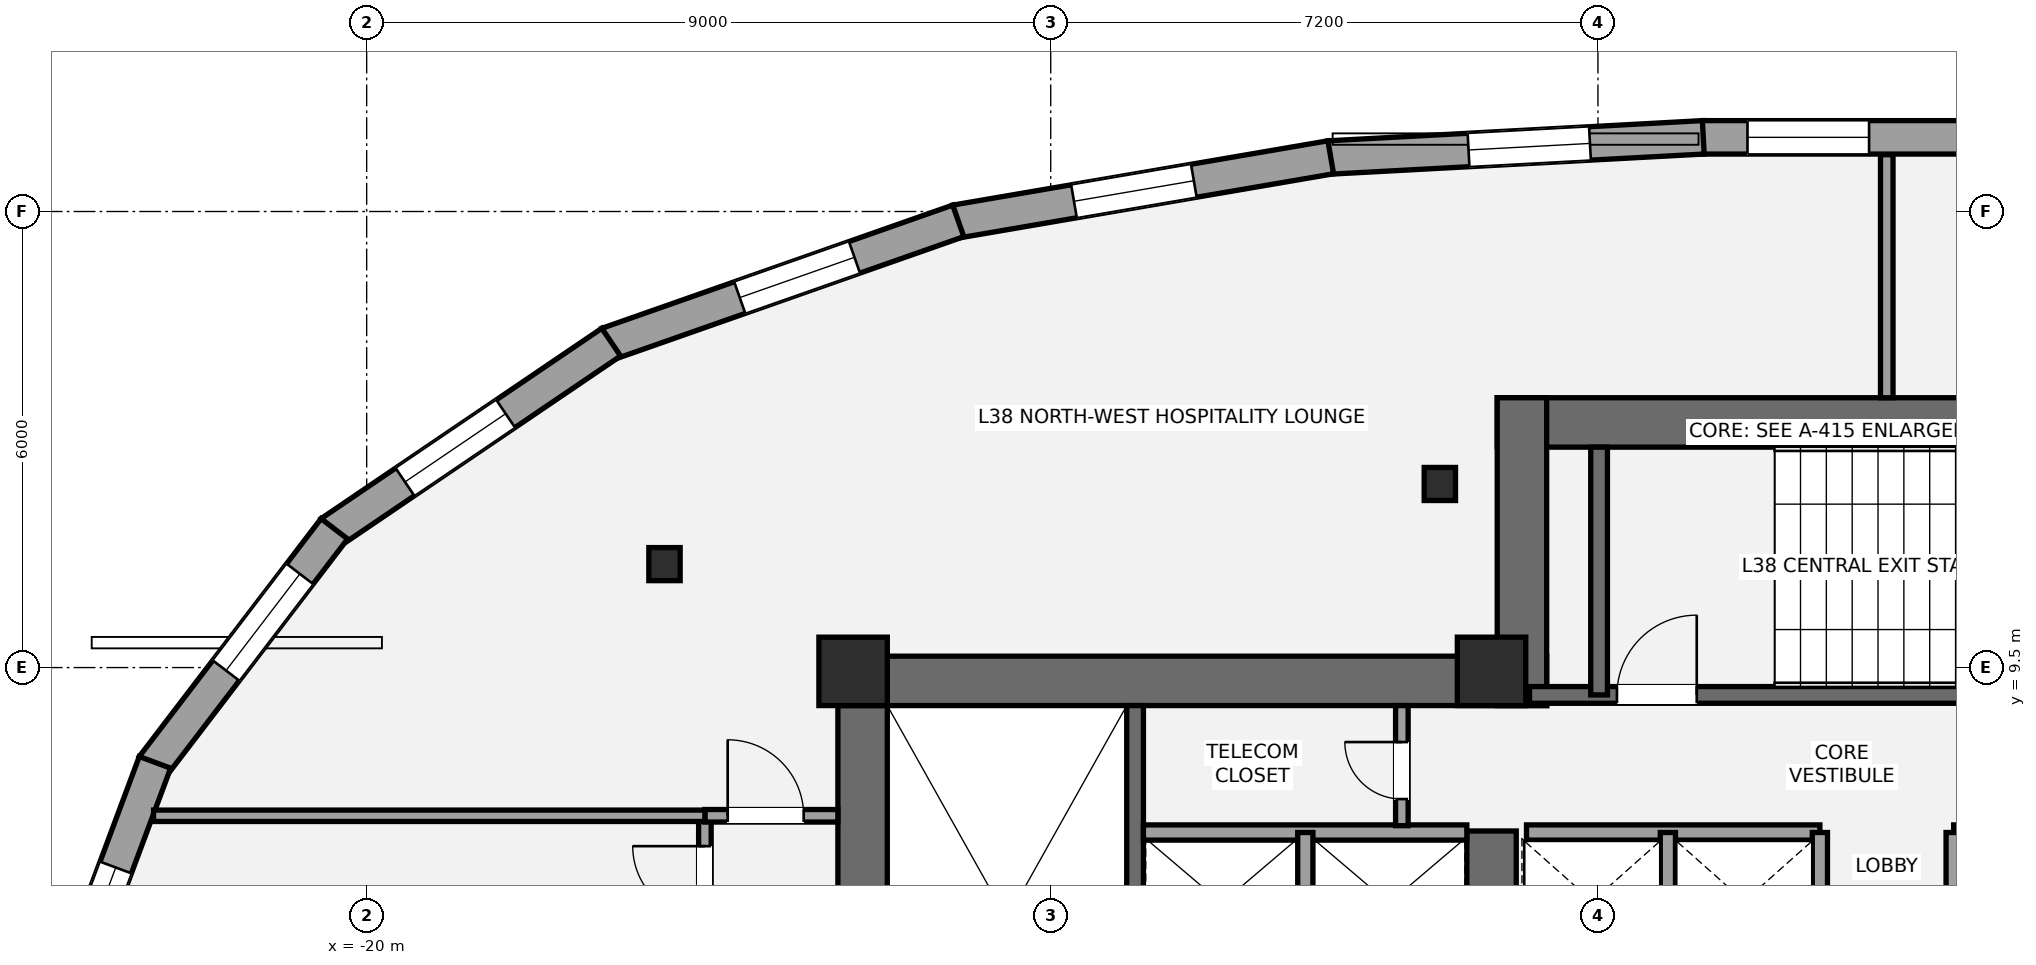
"""IFC4 building model, lengths in metres.
Left out: names, types, materials, properties, quantities, classifications, styles, units other than length and angle.
Written with IfcOpenShell. Run it as: python <this file> out.ifc"""

import sys

from ifc_helpers import new_model, si_unit, direction, frame, frame_2d, origin, origin_2d, place, context, subcontext, project, spatial, rectangle, i_section, extrude, element, fill, save


model = new_model("IFC4")
c1 = context("Model", 3, precision=1e-05, world=origin(), true_north=direction((0.0, 1.0)))
c2 = subcontext(c1, "Body", "Model", "MODEL_VIEW")
j1 = project(units=[si_unit("LENGTHUNIT", "METRE"), si_unit("PLANEANGLEUNIT", "RADIAN")], contexts=[c1])
p1 = place(None, origin())
s1 = spatial("IfcSite", under=j1, at=p1, CompositionType="ELEMENT")
p2 = place(p1, origin())
s2 = spatial("IfcBuilding", under=s1, at=p2, CompositionType="ELEMENT")
p3 = place(p2, frame((0.0, 0.0, 143.8)))
s3 = spatial("IfcBuildingStorey", under=s2, at=p3, CompositionType="ELEMENT", Elevation=143.8)
p4 = place(p3, frame((-13.475, 1.2, 0.0), z_axis=(0.0, 0.0, 1.0), x_axis=(0.0, 1.0, 0.0)))
e1 = element("IfcWall", 1, at=p4, inside=s3, PredefinedType="SHEAR", context=c2, shape_type="SweptSolid", body=[
    extrude(rectangle(XDim=8.45, YDim=0.65, at=frame_2d((4.225, 0.0))), origin(), (0.0, 0.0, 1.0), 3.2),
])
p5 = place(p3, frame((-13.8, 9.325, 0.0), z_axis=(0.0, 0.0, 1.0), x_axis=(1.0, 0.0, 0.0)))
e2 = element("IfcWall", 2, at=p5, inside=s3, PredefinedType="SHEAR", context=c2, shape_type="SweptSolid", body=[
    extrude(rectangle(XDim=9.325, YDim=0.65, at=frame_2d((4.663, 0.0))), origin(), (0.0, 0.0, 1.0), 3.2),
])
p6 = place(p3, frame((-5.2, 5.35, 0.0), z_axis=(0.0, 0.0, 1.0), x_axis=(0.0, 1.0, 0.0)))
e3 = element("IfcWall", 3, at=p6, inside=s3, PredefinedType="SHEAR", context=c2, shape_type="SweptSolid", body=[
    extrude(rectangle(XDim=2.0, YDim=0.65, at=frame_2d((1.0, 0.0))), origin(), (0.0, 0.0, 1.0), 3.2),
])
p7 = place(p3, frame((-9.89, 1.85, 0.0), z_axis=(0.0, 0.0, 1.0), x_axis=(0.0, 1.0, 0.0)))
e4 = element("IfcWall", 4, at=p7, inside=s3, PredefinedType="SHEAR", context=c2, shape_type="SweptSolid", body=[
    extrude(rectangle(XDim=7.15, YDim=0.22, at=frame_2d((3.575, 0.0))), origin(), (0.0, 0.0, 1.0), 3.2),
])
p8 = place(p3, frame((-5.125, 12.725, 0.0), z_axis=(0.0, 0.0, 1.0), x_axis=(1.0, 0.0, 0.0)))
e5 = element("IfcWall", 5, at=p8, inside=s3, PredefinedType="SHEAR", context=c2, shape_type="SweptSolid", body=[
    extrude(rectangle(XDim=10.25, YDim=0.65, at=frame_2d((5.125, 0.0))), origin(), (0.0, 0.0, 1.0), 3.2),
])
p9 = place(p3, frame((-4.8, 9.0, 0.0), z_axis=(0.0, 0.0, 1.0), x_axis=(0.0, 1.0, 0.0)))
e6 = element("IfcWall", 6, at=p9, inside=s3, PredefinedType="SHEAR", context=c2, shape_type="SweptSolid", body=[
    extrude(rectangle(XDim=4.05, YDim=0.65, at=frame_2d((2.025, 0.0))), origin(), (0.0, 0.0, 1.0), 3.2),
])
p10 = place(p3, frame((-4.7, 9.14, 0.0), z_axis=(0.0, 0.0, 1.0), x_axis=(1.0, 0.0, 0.0)))
e7 = element("IfcWall", 7, at=p10, inside=s3, PredefinedType="SHEAR", context=c2, shape_type="SweptSolid", body=[
    extrude(rectangle(XDim=9.3, YDim=0.22, at=frame_2d((4.65, 0.0))), origin(), (0.0, 0.0, 1.0), 3.2),
])
p11 = place(p10, frame((1.15, 0.0, 0.0)))
e8 = element("IfcOpeningElement", 8, at=p11, cuts=e7, PredefinedType="OPENING", context=c2, shape_type="SweptSolid", body=[
    extrude(rectangle(XDim=1.05, YDim=2.15, at=frame_2d((0.525, 1.075))), frame((0.0, 0.12, 0.0), z_axis=(0.0, -1.0, 0.0), x_axis=(1.0, 0.0, 0.0)), (0.0, 0.0, 1.0), 0.24),
])
p12 = place(p3, frame((-3.785, 9.14, 0.0), z_axis=(0.0, 0.0, 1.0), x_axis=(0.0, 1.0, 0.0)))
e9 = element("IfcWall", 9, at=p12, inside=s3, PredefinedType="SHEAR", context=c2, shape_type="SweptSolid", body=[
    extrude(rectangle(XDim=3.26, YDim=0.22, at=frame_2d((1.63, 0.0))), origin(), (0.0, 0.0, 1.0), 3.2),
])
for number, where, z_axis, x_axis in (
    (10, (-13.6, 9.45, 0.0), (0.0, 0.0, 1.0), (1.0, 0.0, 0.0)),
    (11, (-5.2, 9.45, 0.0), (0.0, 0.0, 1.0), (1.0, 0.0, 0.0)),
):
    element("IfcColumn", number, at=place(p3, frame(where, z_axis=z_axis, x_axis=x_axis)), inside=s3, PredefinedType="COLUMN", context=c2, shape_type="SweptSolid", body=[
        extrude(rectangle(XDim=0.9, YDim=0.9, at=origin_2d()), origin(), (0.0, 0.0, 1.0), 3.2),
    ])
for number, where, z_axis, x_axis in (
    (12, (-5.88, 11.915, 0.0), (0.0, 0.0, 1.0), (1.0, 0.0, 0.0)),
    (13, (-16.082, 10.861, 0.0), (0.0, 0.0, 1.0), (1.0, 0.0, 0.0)),
):
    element("IfcColumn", number, at=place(p3, frame(where, z_axis=z_axis, x_axis=x_axis)), inside=s3, PredefinedType="COLUMN", context=c2, shape_type="SweptSolid", body=[
        extrude(i_section(OverallWidth=0.412, OverallDepth=0.435, WebThickness=0.036, FlangeThickness=0.057, at=origin_2d()), origin(), (0.0, 0.0, 1.0), 3.2),
    ])
p13 = place(p3, frame((-2.426, 16.476, 0.0), z_axis=(0.0, 0.0, 1.0), x_axis=(1.0, 0.0, 0.0)))
e14 = element("IfcWall", 14, at=p13, inside=s3, PredefinedType="STANDARD", context=c2, shape_type="SweptSolid", body=[
    extrude(rectangle(XDim=4.852, YDim=0.44, at=frame_2d((2.426, 0.0))), origin(), (0.0, 0.0, 1.0), 2.315),
])
p14 = place(p13, frame((0.594, 0.0, 0.58)))
e15 = element("IfcOpeningElement", 15, at=p14, cuts=e14, PredefinedType="OPENING", context=c2, shape_type="SweptSolid", body=[
    extrude(rectangle(XDim=1.6, YDim=1.55, at=frame_2d((0.8, 0.775))), frame((0.0, 0.23, 0.0), z_axis=(0.0, -1.0, 0.0), x_axis=(1.0, 0.0, 0.0)), (0.0, 0.0, 1.0), 0.46),
])
p15 = place(p3, frame((-7.341, 16.21, 0.0), z_axis=(0.0, 0.0, 1.0), x_axis=(0.998547098553, 0.05388591627, 0.0)))
e16 = element("IfcWall", 16, at=p15, inside=s3, PredefinedType="STANDARD", context=c2, shape_type="SweptSolid", body=[
    extrude(rectangle(XDim=4.934, YDim=0.44, at=frame_2d((2.467, 0.0))), origin(), (0.0, 0.0, 1.0), 2.315),
])
p16 = place(p15, frame((1.841, 0.0, 0.58)))
e17 = element("IfcOpeningElement", 17, at=p16, cuts=e16, PredefinedType="OPENING", context=c2, shape_type="SweptSolid", body=[
    extrude(rectangle(XDim=1.6, YDim=1.55, at=frame_2d((0.8, 0.775))), frame((0.0, 0.23, 0.0), z_axis=(0.0, -1.0, 0.0), x_axis=(1.0, 0.0, 0.0)), (0.0, 0.0, 1.0), 0.46),
])
p17 = place(p3, frame((-12.252, 15.367, 0.0), z_axis=(0.0, 0.0, 1.0), x_axis=(0.985640803986, 0.168855575915, 0.0)))
e18 = element("IfcWall", 18, at=p17, inside=s3, PredefinedType="STANDARD", context=c2, shape_type="SweptSolid", body=[
    extrude(rectangle(XDim=5.009, YDim=0.44, at=frame_2d((2.504, 0.0))), origin(), (0.0, 0.0, 1.0), 2.315),
])
p18 = place(p17, frame((1.581, 0.0, 0.58)))
e19 = element("IfcOpeningElement", 19, at=p18, cuts=e18, PredefinedType="OPENING", context=c2, shape_type="SweptSolid", body=[
    extrude(rectangle(XDim=1.6, YDim=1.55, at=frame_2d((0.8, 0.775))), frame((0.0, 0.23, 0.0), z_axis=(0.0, -1.0, 0.0), x_axis=(1.0, 0.0, 0.0)), (0.0, 0.0, 1.0), 0.46),
])
p19 = place(p3, frame((-16.833, 13.756, 0.0), z_axis=(0.0, 0.0, 1.0), x_axis=(0.943528860281, 0.331290340662, 0.0)))
e20 = element("IfcWall", 20, at=p19, inside=s3, PredefinedType="STANDARD", context=c2, shape_type="SweptSolid", body=[
    extrude(rectangle(XDim=4.893, YDim=0.44, at=frame_2d((2.447, 0.0))), origin(), (0.0, 0.0, 1.0), 2.315),
])
p20 = place(p19, frame((1.846, 0.0, 0.58)))
e21 = element("IfcOpeningElement", 21, at=p20, cuts=e20, PredefinedType="OPENING", context=c2, shape_type="SweptSolid", body=[
    extrude(rectangle(XDim=1.6, YDim=1.55, at=frame_2d((0.8, 0.775))), frame((0.0, 0.23, 0.0), z_axis=(0.0, -1.0, 0.0), x_axis=(1.0, 0.0, 0.0)), (0.0, 0.0, 1.0), 0.46),
])
p21 = place(p3, frame((-20.477, 11.277, 0.0), z_axis=(0.0, 0.0, 1.0), x_axis=(0.827741657842, 0.561109390291, 0.0)))
e22 = element("IfcWall", 22, at=p21, inside=s3, PredefinedType="STANDARD", context=c2, shape_type="SweptSolid", body=[
    extrude(rectangle(XDim=4.463, YDim=0.44, at=frame_2d((2.231, 0.0))), origin(), (0.0, 0.0, 1.0), 2.315),
])
p22 = place(p21, frame((1.185, 0.0, 0.58)))
e23 = element("IfcOpeningElement", 23, at=p22, cuts=e22, PredefinedType="OPENING", context=c2, shape_type="SweptSolid", body=[
    extrude(rectangle(XDim=1.6, YDim=1.55, at=frame_2d((0.8, 0.775))), frame((0.0, 0.23, 0.0), z_axis=(0.0, -1.0, 0.0), x_axis=(1.0, 0.0, 0.0)), (0.0, 0.0, 1.0), 0.46),
])
p23 = place(p3, frame((-22.817, 8.196, 0.0), z_axis=(0.0, 0.0, 1.0), x_axis=(0.607215400231, 0.794537260122, 0.0)))
e24 = element("IfcWall", 24, at=p23, inside=s3, PredefinedType="STANDARD", context=c2, shape_type="SweptSolid", body=[
    extrude(rectangle(XDim=3.939, YDim=0.44, at=frame_2d((1.969, 0.0))), origin(), (0.0, 0.0, 1.0), 2.315),
])
p24 = place(p23, frame((1.592, 0.0, 0.58)))
e25 = element("IfcOpeningElement", 25, at=p24, cuts=e24, PredefinedType="OPENING", context=c2, shape_type="SweptSolid", body=[
    extrude(rectangle(XDim=1.6, YDim=1.55, at=frame_2d((0.8, 0.775))), frame((0.0, 0.23, 0.0), z_axis=(0.0, -1.0, 0.0), x_axis=(1.0, 0.0, 0.0)), (0.0, 0.0, 1.0), 0.46),
])
p25 = place(p3, frame((-24.033, 4.907, 0.0), z_axis=(0.0, 0.0, 1.0), x_axis=(0.349422124021, 0.936965409844, 0.0)))
e26 = element("IfcWall", 26, at=p25, inside=s3, PredefinedType="STANDARD", context=c2, shape_type="SweptSolid", body=[
    extrude(rectangle(XDim=3.571, YDim=0.44, at=frame_2d((1.786, 0.0))), origin(), (0.0, 0.0, 1.0), 2.315),
])
p26 = place(p25, frame((0.495, 0.0, 0.58)))
e27 = element("IfcOpeningElement", 27, at=p26, cuts=e26, PredefinedType="OPENING", context=c2, shape_type="SweptSolid", body=[
    extrude(rectangle(XDim=1.6, YDim=1.55, at=frame_2d((0.8, 0.775))), frame((0.0, 0.23, 0.0), z_axis=(0.0, -1.0, 0.0), x_axis=(1.0, 0.0, 0.0)), (0.0, 0.0, 1.0), 0.46),
])
p27 = place(p3, frame((-9.78, 7.33, 0.0), z_axis=(0.0, 0.0, 1.0), x_axis=(1.0, 0.0, 0.0)))
e28 = element("IfcWall", 28, at=p27, inside=s3, PredefinedType="SOLIDWALL", context=c2, shape_type="SweptSolid", body=[
    extrude(rectangle(XDim=4.255, YDim=0.2, at=frame_2d((2.127, 0.0))), origin(), (0.0, 0.0, 1.0), 3.02),
])
p28 = place(p3, frame((-7.65, 5.47, 0.0), z_axis=(0.0, 0.0, 1.0), x_axis=(0.0, 1.0, 0.0)))
e29 = element("IfcWall", 29, at=p28, inside=s3, PredefinedType="SOLIDWALL", context=c2, shape_type="SweptSolid", body=[
    extrude(rectangle(XDim=1.86, YDim=0.2, at=frame_2d((0.93, 0.0))), origin(), (0.0, 0.0, 1.0), 3.02),
])
for number, where, z_axis, x_axis in (
    (30, (-4.74, 7.33, 0.0), (0.0, 0.0, 1.0), (1.0, 0.0, 0.0)),
    (31, (0.88, 7.33, 0.0), (0.0, 0.0, 1.0), (1.0, 0.0, 0.0)),
):
    element("IfcWall", number, at=place(p3, frame(where, z_axis=z_axis, x_axis=x_axis)), inside=s3, PredefinedType="SOLIDWALL", context=c2, shape_type="SweptSolid", body=[
        extrude(rectangle(XDim=3.86, YDim=0.2, at=frame_2d((1.93, 0.0))), origin(), (0.0, 0.0, 1.0), 3.02),
    ])
for number, where, z_axis, x_axis in (
    (32, (-2.88, 5.52, 0.0), (0.0, 0.0, 1.0), (0.0, 1.0, 0.0)),
    (33, (-0.88, 5.52, 0.0), (0.0, 0.0, 1.0), (0.0, 1.0, 0.0)),
    (34, (0.88, 5.52, 0.0), (0.0, 0.0, 1.0), (0.0, 1.0, 0.0)),
):
    element("IfcWall", number, at=place(p3, frame(where, z_axis=z_axis, x_axis=x_axis)), inside=s3, PredefinedType="SOLIDWALL", context=c2, shape_type="SweptSolid", body=[
        extrude(rectangle(XDim=1.81, YDim=0.2, at=frame_2d((0.905, 0.0))), origin(), (0.0, 0.0, 1.0), 3.02),
    ])
p29 = place(p3, frame((-6.38, 7.42, 0.0), z_axis=(0.0, 0.0, 1.0), x_axis=(0.0, 1.0, 0.0)))
e35 = element("IfcWall", 35, at=p29, inside=s3, PredefinedType="PARTITIONING", context=c2, shape_type="SweptSolid", body=[
    extrude(rectangle(XDim=1.58, YDim=0.165, at=frame_2d((0.79, 0.0))), origin(), (0.0, 0.0, 1.0), 3.02),
])
p30 = place(p29, frame((0.35, 0.0, 0.0)))
e36 = element("IfcOpeningElement", 36, at=p30, cuts=e35, PredefinedType="OPENING", context=c2, shape_type="SweptSolid", body=[
    extrude(rectangle(XDim=0.75, YDim=2.1, at=frame_2d((0.375, 1.05))), frame((0.0, 0.093, 0.0), z_axis=(0.0, -1.0, 0.0), x_axis=(1.0, 0.0, 0.0)), (0.0, 0.0, 1.0), 0.185),
])
p31 = place(p3, frame((-15.55, -13.965, 0.0), z_axis=(0.0, 0.0, 1.0), x_axis=(0.0, 1.0, 0.0)))
e37 = element("IfcWall", 37, at=p31, inside=s3, PredefinedType="PARTITIONING", context=c2, shape_type="SweptSolid", body=[
    extrude(rectangle(XDim=21.515, YDim=0.165, at=frame_2d((10.757, 0.0))), origin(), (0.0, 0.0, 1.0), 2.473),
])
p32 = place(p31, frame((6.964, 0.0, 0.0)))
e38 = element("IfcOpeningElement", 38, at=p32, cuts=e37, PredefinedType="OPENING", context=c2, shape_type="SweptSolid", body=[
    extrude(rectangle(XDim=0.85, YDim=2.1, at=frame_2d((0.425, 1.05))), frame((0.0, 0.093, 0.0), z_axis=(0.0, -1.0, 0.0), x_axis=(1.0, 0.0, 0.0)), (0.0, 0.0, 1.0), 0.185),
])
p33 = place(p31, frame((11.014, 0.0, 0.0)))
e39 = element("IfcOpeningElement", 39, at=p33, cuts=e37, PredefinedType="OPENING", context=c2, shape_type="SweptSolid", body=[
    extrude(rectangle(XDim=0.95, YDim=2.15, at=frame_2d((0.475, 1.075))), frame((0.0, 0.093, 0.0), z_axis=(0.0, -1.0, 0.0), x_axis=(1.0, 0.0, 0.0)), (0.0, 0.0, 1.0), 0.185),
])
p34 = place(p31, frame((15.414, 0.0, 0.0)))
e40 = element("IfcOpeningElement", 40, at=p34, cuts=e37, PredefinedType="OPENING", context=c2, shape_type="SweptSolid", body=[
    extrude(rectangle(XDim=0.95, YDim=2.15, at=frame_2d((0.475, 1.075))), frame((0.0, 0.093, 0.0), z_axis=(0.0, -1.0, 0.0), x_axis=(1.0, 0.0, 0.0)), (0.0, 0.0, 1.0), 0.185),
])
p35 = place(p31, frame((20.165, 0.0, 0.0)))
e41 = element("IfcOpeningElement", 41, at=p35, cuts=e37, PredefinedType="OPENING", context=c2, shape_type="SweptSolid", body=[
    extrude(rectangle(XDim=0.95, YDim=2.15, at=frame_2d((0.475, 1.075))), frame((0.0, 0.093, 0.0), z_axis=(0.0, -1.0, 0.0), x_axis=(1.0, 0.0, 0.0)), (0.0, 0.0, 1.0), 0.185),
])
p36 = place(p3, frame((-15.55, 7.55, 0.0), z_axis=(0.0, 0.0, 1.0), x_axis=(1.0, 0.0, 0.0)))
e42 = element("IfcWall", 42, at=p36, inside=s3, PredefinedType="PARTITIONING", context=c2, shape_type="SweptSolid", body=[
    extrude(rectangle(XDim=1.75, YDim=0.165, at=frame_2d((0.875, 0.0))), origin(), (0.0, 0.0, 1.0), 2.473),
])
p37 = place(p36, frame((0.3, 0.0, 0.0)))
e43 = element("IfcOpeningElement", 43, at=p37, cuts=e42, PredefinedType="OPENING", context=c2, shape_type="SweptSolid", body=[
    extrude(rectangle(XDim=1.0, YDim=2.15, at=frame_2d((0.5, 1.075))), frame((0.0, 0.093, 0.0), z_axis=(0.0, -1.0, 0.0), x_axis=(1.0, 0.0, 0.0)), (0.0, 0.0, 1.0), 0.185),
])
p38 = place(p3, frame((-22.804, 7.55, 0.0), z_axis=(0.0, 0.0, 1.0), x_axis=(1.0, 0.0, 0.0)))
e44 = element("IfcWall", 44, at=p38, inside=s3, PredefinedType="PLUMBINGWALL", context=c2, shape_type="SweptSolid", body=[
    extrude(rectangle(XDim=7.254, YDim=0.15, at=frame_2d((3.627, 0.0))), origin(), (0.0, 0.0, 1.0), 2.473),
])
p39 = place(p3, frame((0.0, 13.05, 0.0), z_axis=(0.0, 0.0, 1.0), x_axis=(0.0, 1.0, 0.0)))
e45 = element("IfcWall", 45, at=p39, inside=s3, PredefinedType="PARTITIONING", context=c2, shape_type="SweptSolid", body=[
    extrude(rectangle(XDim=3.198, YDim=0.165, at=frame_2d((1.599, 0.0))), origin(), (0.0, 0.0, 1.0), 3.02),
])
p40 = place(p14, origin())
e46 = element("IfcWindow", 46, at=p40, inside=s3, PartitioningType="SINGLE_PANEL", PredefinedType="WINDOW", context=c2, shape_type="SweptSolid", body=[
    extrude(rectangle(XDim=1.6, YDim=1.55, at=frame_2d((0.8, 0.775))), frame((0.0, -0.01, 0.0), z_axis=(0.0, -1.0, 0.0), x_axis=(1.0, 0.0, 0.0)), (0.0, 0.0, 1.0), 0.06),
])
fill(e15, e46)
p41 = place(p16, origin())
e47 = element("IfcWindow", 47, at=p41, inside=s3, PartitioningType="SINGLE_PANEL", PredefinedType="WINDOW", context=c2, shape_type="SweptSolid", body=[
    extrude(rectangle(XDim=1.6, YDim=1.55, at=frame_2d((0.8, 0.775))), frame((0.0, -0.01, 0.0), z_axis=(0.0, -1.0, 0.0), x_axis=(1.0, 0.0, 0.0)), (0.0, 0.0, 1.0), 0.06),
])
fill(e17, e47)
p42 = place(p18, origin())
e48 = element("IfcWindow", 48, at=p42, inside=s3, PartitioningType="SINGLE_PANEL", PredefinedType="WINDOW", context=c2, shape_type="SweptSolid", body=[
    extrude(rectangle(XDim=1.6, YDim=1.55, at=frame_2d((0.8, 0.775))), frame((0.0, -0.01, 0.0), z_axis=(0.0, -1.0, 0.0), x_axis=(1.0, 0.0, 0.0)), (0.0, 0.0, 1.0), 0.06),
])
fill(e19, e48)
p43 = place(p20, origin())
e49 = element("IfcWindow", 49, at=p43, inside=s3, PartitioningType="SINGLE_PANEL", PredefinedType="WINDOW", context=c2, shape_type="SweptSolid", body=[
    extrude(rectangle(XDim=1.6, YDim=1.55, at=frame_2d((0.8, 0.775))), frame((0.0, -0.01, 0.0), z_axis=(0.0, -1.0, 0.0), x_axis=(1.0, 0.0, 0.0)), (0.0, 0.0, 1.0), 0.06),
])
fill(e21, e49)
p44 = place(p22, origin())
e50 = element("IfcWindow", 50, at=p44, inside=s3, PartitioningType="SINGLE_PANEL", PredefinedType="WINDOW", context=c2, shape_type="SweptSolid", body=[
    extrude(rectangle(XDim=1.6, YDim=1.55, at=frame_2d((0.8, 0.775))), frame((0.0, -0.01, 0.0), z_axis=(0.0, -1.0, 0.0), x_axis=(1.0, 0.0, 0.0)), (0.0, 0.0, 1.0), 0.06),
])
fill(e23, e50)
p45 = place(p24, origin())
e51 = element("IfcWindow", 51, at=p45, inside=s3, PartitioningType="SINGLE_PANEL", PredefinedType="WINDOW", context=c2, shape_type="SweptSolid", body=[
    extrude(rectangle(XDim=1.6, YDim=1.55, at=frame_2d((0.8, 0.775))), frame((0.0, -0.01, 0.0), z_axis=(0.0, -1.0, 0.0), x_axis=(1.0, 0.0, 0.0)), (0.0, 0.0, 1.0), 0.06),
])
fill(e25, e51)
p46 = place(p26, origin())
e52 = element("IfcWindow", 52, at=p46, inside=s3, PartitioningType="SINGLE_PANEL", PredefinedType="WINDOW", context=c2, shape_type="SweptSolid", body=[
    extrude(rectangle(XDim=1.6, YDim=1.55, at=frame_2d((0.8, 0.775))), frame((0.0, -0.01, 0.0), z_axis=(0.0, -1.0, 0.0), x_axis=(1.0, 0.0, 0.0)), (0.0, 0.0, 1.0), 0.06),
])
fill(e27, e52)
p47 = place(p11, origin())
e53 = element("IfcDoor", 53, at=p47, inside=s3, OperationType="SINGLE_SWING_RIGHT", PredefinedType="DOOR", context=c2, shape_type="SweptSolid", body=[
    extrude(rectangle(XDim=1.05, YDim=2.15, at=frame_2d((0.525, 1.075))), frame((0.0, 0.025, 0.0), z_axis=(0.0, -1.0, 0.0), x_axis=(1.0, 0.0, 0.0)), (0.0, 0.0, 1.0), 0.05),
])
fill(e8, e53)
p48 = place(p30, origin())
e54 = element("IfcDoor", 54, at=p48, inside=s3, OperationType="SINGLE_SWING_RIGHT", PredefinedType="DOOR", context=c2, shape_type="SweptSolid", body=[
    extrude(rectangle(XDim=0.75, YDim=2.1, at=frame_2d((0.375, 1.05))), frame((0.0, 0.025, 0.0), z_axis=(0.0, -1.0, 0.0), x_axis=(1.0, 0.0, 0.0)), (0.0, 0.0, 1.0), 0.05),
])
fill(e36, e54)
p49 = place(p37, origin())
e55 = element("IfcDoor", 55, at=p49, inside=s3, OperationType="SINGLE_SWING_LEFT", PredefinedType="DOOR", context=c2, shape_type="SweptSolid", body=[
    extrude(rectangle(XDim=1.0, YDim=2.15, at=frame_2d((0.5, 1.075))), frame((0.0, 0.025, 0.0), z_axis=(0.0, -1.0, 0.0), x_axis=(1.0, 0.0, 0.0)), (0.0, 0.0, 1.0), 0.05),
])
fill(e43, e55)
p50 = place(p35, origin())
e56 = element("IfcDoor", 56, at=p50, inside=s3, OperationType="SINGLE_SWING_RIGHT", PredefinedType="DOOR", context=c2, shape_type="SweptSolid", body=[
    extrude(rectangle(XDim=0.95, YDim=2.15, at=frame_2d((0.475, 1.075))), frame((0.0, 0.025, 0.0), z_axis=(0.0, -1.0, 0.0), x_axis=(1.0, 0.0, 0.0)), (0.0, 0.0, 1.0), 0.05),
])
fill(e41, e56)
save(model, sys.argv[1])
